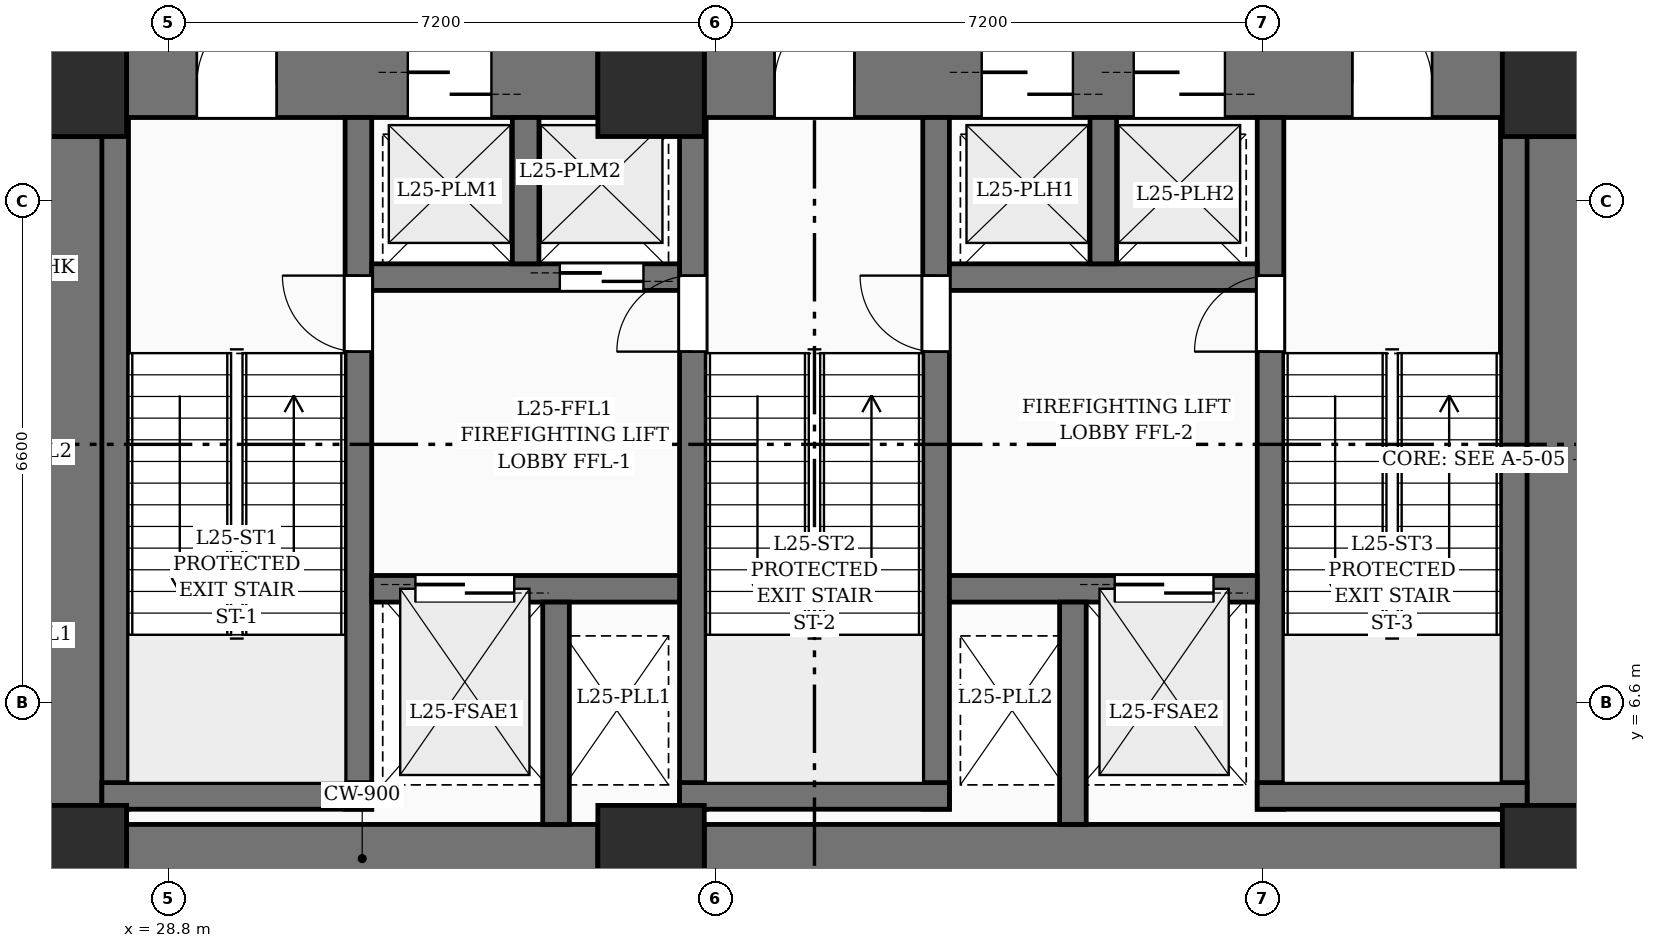
"""IFC4 building model, lengths in metres.
Left out: names, types, materials, properties, quantities, classifications, styles, units other than length and angle.
Written with IfcOpenShell. Run it as: python <this file> out.ifc"""

import sys

from ifc_helpers import new_model, si_unit, direction, frame, frame_2d, origin, origin_2d, place, context, subcontext, project, spatial, rectangle, extrude, element, fill, save


model = new_model("IFC4")
c1 = context("Model", 3, precision=1e-05, world=origin(), true_north=direction((0.0, 1.0)))
c2 = subcontext(c1, "Body", "Model", "MODEL_VIEW")
j1 = project(units=[si_unit("LENGTHUNIT", "METRE"), si_unit("PLANEANGLEUNIT", "RADIAN")], contexts=[c1])
p1 = place(None, origin())
s1 = spatial("IfcSite", under=j1, at=p1, CompositionType="ELEMENT")
p2 = place(p1, origin())
s2 = spatial("IfcBuilding", under=s1, at=p2, CompositionType="ELEMENT")
p3 = place(p2, frame((0.0, 0.0, 100.2)))
s3 = spatial("IfcBuildingStorey", under=s2, at=p3, CompositionType="ELEMENT", Elevation=100.2)
for number, where, z_axis, x_axis in (
    (1, (27.55, 4.55, 0.0), (0.0, 0.0, 1.0), (1.0, 0.0, 0.0)),
    (2, (35.15, 4.55, 0.0), (0.0, 0.0, 1.0), (1.0, 0.0, 0.0)),
    (3, (47.05, 4.55, 0.0), (0.0, 0.0, 1.0), (1.0, 0.0, 0.0)),
    (4, (27.55, 14.75, 0.0), (0.0, 0.0, 1.0), (1.0, 0.0, 0.0)),
    (5, (35.15, 14.75, 0.0), (0.0, 0.0, 1.0), (1.0, 0.0, 0.0)),
    (6, (47.05, 14.75, 0.0), (0.0, 0.0, 1.0), (1.0, 0.0, 0.0)),
):
    element("IfcColumn", number, at=place(p3, frame(where, z_axis=z_axis, x_axis=x_axis)), inside=s3, PredefinedType="COLUMN", context=c2, shape_type="SweptSolid", body=[
        extrude(rectangle(XDim=1.4, YDim=1.4, at=origin_2d()), origin(), (0.0, 0.0, 1.0), 4.8),
    ])
p4 = place(p3, frame((28.25, 4.55, 0.0), z_axis=(0.0, 0.0, 1.0), x_axis=(1.0, 0.0, 0.0)))
e7 = element("IfcWall", 7, at=p4, inside=s3, PredefinedType="SHEAR", context=c2, shape_type="SweptSolid", body=[
    extrude(rectangle(XDim=6.2, YDim=0.9, at=frame_2d((3.1, 0.0))), origin(), (0.0, 0.0, 1.0), 4.8),
])
p5 = place(p3, frame((35.85, 4.55, 0.0), z_axis=(0.0, 0.0, 1.0), x_axis=(1.0, 0.0, 0.0)))
e8 = element("IfcWall", 8, at=p5, inside=s3, PredefinedType="SHEAR", context=c2, shape_type="SweptSolid", body=[
    extrude(rectangle(XDim=10.5, YDim=0.9, at=frame_2d((5.25, 0.0))), origin(), (0.0, 0.0, 1.0), 4.8),
])
p6 = place(p3, frame((28.25, 14.75, 0.0), z_axis=(0.0, 0.0, 1.0), x_axis=(1.0, 0.0, 0.0)))
e9 = element("IfcWall", 9, at=p6, inside=s3, PredefinedType="SHEAR", context=c2, shape_type="SweptSolid", body=[
    extrude(rectangle(XDim=6.2, YDim=0.9, at=frame_2d((3.1, 0.0))), origin(), (0.0, 0.0, 1.0), 4.8),
])
p7 = place(p6, frame((0.925, 0.0, 0.0)))
e10 = element("IfcOpeningElement", 10, at=p7, cuts=e9, PredefinedType="OPENING", context=c2, shape_type="SweptSolid", body=[
    extrude(rectangle(XDim=1.05, YDim=2.15, at=frame_2d((0.525, 1.075))), frame((0.0, 0.46, 0.0), z_axis=(0.0, -1.0, 0.0), x_axis=(1.0, 0.0, 0.0)), (0.0, 0.0, 1.0), 0.92),
])
p8 = place(p6, frame((3.7, 0.0, 0.0)))
e11 = element("IfcOpeningElement", 11, at=p8, cuts=e9, PredefinedType="OPENING", context=c2, shape_type="SweptSolid", body=[
    extrude(rectangle(XDim=1.1, YDim=2.2, at=frame_2d((0.55, 1.1))), frame((0.0, 0.46, 0.0), z_axis=(0.0, -1.0, 0.0), x_axis=(1.0, 0.0, 0.0)), (0.0, 0.0, 1.0), 0.92),
])
p9 = place(p3, frame((35.85, 14.75, 0.0), z_axis=(0.0, 0.0, 1.0), x_axis=(1.0, 0.0, 0.0)))
e12 = element("IfcWall", 12, at=p9, inside=s3, PredefinedType="SHEAR", context=c2, shape_type="SweptSolid", body=[
    extrude(rectangle(XDim=10.5, YDim=0.9, at=frame_2d((5.25, 0.0))), origin(), (0.0, 0.0, 1.0), 4.8),
])
p10 = place(p9, frame((0.925, 0.0, 0.0)))
e13 = element("IfcOpeningElement", 13, at=p10, cuts=e12, PredefinedType="OPENING", context=c2, shape_type="SweptSolid", body=[
    extrude(rectangle(XDim=1.05, YDim=2.15, at=frame_2d((0.525, 1.075))), frame((0.0, 0.46, 0.0), z_axis=(0.0, -1.0, 0.0), x_axis=(1.0, 0.0, 0.0)), (0.0, 0.0, 1.0), 0.92),
])
p11 = place(p9, frame((8.525, 0.0, 0.0)))
e14 = element("IfcOpeningElement", 14, at=p11, cuts=e12, PredefinedType="OPENING", context=c2, shape_type="SweptSolid", body=[
    extrude(rectangle(XDim=1.05, YDim=2.15, at=frame_2d((0.525, 1.075))), frame((0.0, 0.46, 0.0), z_axis=(0.0, -1.0, 0.0), x_axis=(1.0, 0.0, 0.0)), (0.0, 0.0, 1.0), 0.92),
])
p12 = place(p9, frame((3.65, 0.0, 0.0)))
e15 = element("IfcOpeningElement", 15, at=p12, cuts=e12, PredefinedType="OPENING", context=c2, shape_type="SweptSolid", body=[
    extrude(rectangle(XDim=1.2, YDim=2.2, at=frame_2d((0.6, 1.1))), frame((0.0, 0.46, 0.0), z_axis=(0.0, -1.0, 0.0), x_axis=(1.0, 0.0, 0.0)), (0.0, 0.0, 1.0), 0.92),
])
p13 = place(p9, frame((5.65, 0.0, 0.0)))
e16 = element("IfcOpeningElement", 16, at=p13, cuts=e12, PredefinedType="OPENING", context=c2, shape_type="SweptSolid", body=[
    extrude(rectangle(XDim=1.2, YDim=2.2, at=frame_2d((0.6, 1.1))), frame((0.0, 0.46, 0.0), z_axis=(0.0, -1.0, 0.0), x_axis=(1.0, 0.0, 0.0)), (0.0, 0.0, 1.0), 0.92),
])
for number, where, z_axis, x_axis in (
    (17, (27.55, 5.25, 0.0), (0.0, 0.0, 1.0), (0.0, 1.0, 0.0)),
    (18, (47.05, 5.25, 0.0), (0.0, 0.0, 1.0), (0.0, 1.0, 0.0)),
):
    element("IfcWall", number, at=place(p3, frame(where, z_axis=z_axis, x_axis=x_axis)), inside=s3, PredefinedType="SHEAR", context=c2, shape_type="SweptSolid", body=[
        extrude(rectangle(XDim=8.8, YDim=0.9, at=frame_2d((4.4, 0.0))), origin(), (0.0, 0.0, 1.0), 4.8),
    ])
p14 = place(p3, frame((28.1, 5.2, 0.0), z_axis=(0.0, 0.0, 1.0), x_axis=(0.0, 1.0, 0.0)))
e19 = element("IfcWall", 19, at=p14, inside=s3, PredefinedType="SOLIDWALL", context=c2, shape_type="SweptSolid", body=[
    extrude(rectangle(XDim=9.1, YDim=0.35, at=frame_2d((4.55, 0.0))), origin(), (0.0, 0.0, 1.0), 4.8),
])
p15 = place(p3, frame((31.3, 5.2, 0.0), z_axis=(0.0, 0.0, 1.0), x_axis=(0.0, 1.0, 0.0)))
e20 = element("IfcWall", 20, at=p15, inside=s3, PredefinedType="SOLIDWALL", context=c2, shape_type="SweptSolid", body=[
    extrude(rectangle(XDim=9.1, YDim=0.35, at=frame_2d((4.55, 0.0))), origin(), (0.0, 0.0, 1.0), 4.8),
])
p16 = place(p15, frame((6.02, 0.0, 0.0)))
e21 = element("IfcOpeningElement", 21, at=p16, cuts=e20, PredefinedType="OPENING", context=c2, shape_type="SweptSolid", body=[
    extrude(rectangle(XDim=1.0, YDim=2.15, at=frame_2d((0.5, 1.075))), frame((0.0, 0.185, 0.0), z_axis=(0.0, -1.0, 0.0), x_axis=(1.0, 0.0, 0.0)), (0.0, 0.0, 1.0), 0.37),
])
p17 = place(p3, frame((27.925, 5.375, 0.0), z_axis=(0.0, 0.0, 1.0), x_axis=(1.0, 0.0, 0.0)))
e22 = element("IfcWall", 22, at=p17, inside=s3, PredefinedType="SOLIDWALL", context=c2, shape_type="SweptSolid", body=[
    extrude(rectangle(XDim=3.55, YDim=0.35, at=frame_2d((1.775, 0.0))), origin(), (0.0, 0.0, 1.0), 4.8),
])
p18 = place(p3, frame((35.7, 5.2, 0.0), z_axis=(0.0, 0.0, 1.0), x_axis=(0.0, 1.0, 0.0)))
e23 = element("IfcWall", 23, at=p18, inside=s3, PredefinedType="SOLIDWALL", context=c2, shape_type="SweptSolid", body=[
    extrude(rectangle(XDim=9.1, YDim=0.35, at=frame_2d((4.55, 0.0))), origin(), (0.0, 0.0, 1.0), 4.8),
])
p19 = place(p18, frame((6.02, 0.0, 0.0)))
e24 = element("IfcOpeningElement", 24, at=p19, cuts=e23, PredefinedType="OPENING", context=c2, shape_type="SweptSolid", body=[
    extrude(rectangle(XDim=1.0, YDim=2.15, at=frame_2d((0.5, 1.075))), frame((0.0, 0.185, 0.0), z_axis=(0.0, -1.0, 0.0), x_axis=(1.0, 0.0, 0.0)), (0.0, 0.0, 1.0), 0.37),
])
p20 = place(p3, frame((38.9, 5.2, 0.0), z_axis=(0.0, 0.0, 1.0), x_axis=(0.0, 1.0, 0.0)))
e25 = element("IfcWall", 25, at=p20, inside=s3, PredefinedType="SOLIDWALL", context=c2, shape_type="SweptSolid", body=[
    extrude(rectangle(XDim=9.1, YDim=0.35, at=frame_2d((4.55, 0.0))), origin(), (0.0, 0.0, 1.0), 4.8),
])
p21 = place(p20, frame((6.02, 0.0, 0.0)))
e26 = element("IfcOpeningElement", 26, at=p21, cuts=e25, PredefinedType="OPENING", context=c2, shape_type="SweptSolid", body=[
    extrude(rectangle(XDim=1.0, YDim=2.15, at=frame_2d((0.5, 1.075))), frame((0.0, 0.185, 0.0), z_axis=(0.0, -1.0, 0.0), x_axis=(1.0, 0.0, 0.0)), (0.0, 0.0, 1.0), 0.37),
])
p22 = place(p3, frame((35.525, 5.375, 0.0), z_axis=(0.0, 0.0, 1.0), x_axis=(1.0, 0.0, 0.0)))
e27 = element("IfcWall", 27, at=p22, inside=s3, PredefinedType="SOLIDWALL", context=c2, shape_type="SweptSolid", body=[
    extrude(rectangle(XDim=3.55, YDim=0.35, at=frame_2d((1.775, 0.0))), origin(), (0.0, 0.0, 1.0), 4.8),
])
p23 = place(p3, frame((43.3, 5.2, 0.0), z_axis=(0.0, 0.0, 1.0), x_axis=(0.0, 1.0, 0.0)))
e28 = element("IfcWall", 28, at=p23, inside=s3, PredefinedType="SOLIDWALL", context=c2, shape_type="SweptSolid", body=[
    extrude(rectangle(XDim=9.1, YDim=0.35, at=frame_2d((4.55, 0.0))), origin(), (0.0, 0.0, 1.0), 4.8),
])
p24 = place(p23, frame((6.02, 0.0, 0.0)))
e29 = element("IfcOpeningElement", 29, at=p24, cuts=e28, PredefinedType="OPENING", context=c2, shape_type="SweptSolid", body=[
    extrude(rectangle(XDim=1.0, YDim=2.15, at=frame_2d((0.5, 1.075))), frame((0.0, 0.185, 0.0), z_axis=(0.0, -1.0, 0.0), x_axis=(1.0, 0.0, 0.0)), (0.0, 0.0, 1.0), 0.37),
])
p25 = place(p3, frame((46.5, 5.2, 0.0), z_axis=(0.0, 0.0, 1.0), x_axis=(0.0, 1.0, 0.0)))
e30 = element("IfcWall", 30, at=p25, inside=s3, PredefinedType="SOLIDWALL", context=c2, shape_type="SweptSolid", body=[
    extrude(rectangle(XDim=9.1, YDim=0.35, at=frame_2d((4.55, 0.0))), origin(), (0.0, 0.0, 1.0), 4.8),
])
p26 = place(p3, frame((43.125, 5.375, 0.0), z_axis=(0.0, 0.0, 1.0), x_axis=(1.0, 0.0, 0.0)))
e31 = element("IfcWall", 31, at=p26, inside=s3, PredefinedType="SOLIDWALL", context=c2, shape_type="SweptSolid", body=[
    extrude(rectangle(XDim=3.55, YDim=0.35, at=frame_2d((1.775, 0.0))), origin(), (0.0, 0.0, 1.0), 4.8),
])
p27 = place(p3, frame((31.475, 8.1, 0.0), z_axis=(0.0, 0.0, 1.0), x_axis=(1.0, 0.0, 0.0)))
e32 = element("IfcWall", 32, at=p27, inside=s3, PredefinedType="SOLIDWALL", context=c2, shape_type="SweptSolid", body=[
    extrude(rectangle(XDim=4.05, YDim=0.35, at=frame_2d((2.025, 0.0))), origin(), (0.0, 0.0, 1.0), 4.8),
])
p28 = place(p27, frame((0.575, 0.0, 0.0)))
e33 = element("IfcOpeningElement", 33, at=p28, cuts=e32, PredefinedType="OPENING", context=c2, shape_type="SweptSolid", body=[
    extrude(rectangle(XDim=1.3, YDim=2.25, at=frame_2d((0.65, 1.125))), frame((0.0, 0.185, 0.0), z_axis=(0.0, -1.0, 0.0), x_axis=(1.0, 0.0, 0.0)), (0.0, 0.0, 1.0), 0.37),
])
p29 = place(p3, frame((39.075, 8.1, 0.0), z_axis=(0.0, 0.0, 1.0), x_axis=(1.0, 0.0, 0.0)))
e34 = element("IfcWall", 34, at=p29, inside=s3, PredefinedType="SOLIDWALL", context=c2, shape_type="SweptSolid", body=[
    extrude(rectangle(XDim=4.05, YDim=0.35, at=frame_2d((2.025, 0.0))), origin(), (0.0, 0.0, 1.0), 4.8),
])
p30 = place(p29, frame((2.175, 0.0, 0.0)))
e35 = element("IfcOpeningElement", 35, at=p30, cuts=e34, PredefinedType="OPENING", context=c2, shape_type="SweptSolid", body=[
    extrude(rectangle(XDim=1.3, YDim=2.25, at=frame_2d((0.65, 1.125))), frame((0.0, 0.185, 0.0), z_axis=(0.0, -1.0, 0.0), x_axis=(1.0, 0.0, 0.0)), (0.0, 0.0, 1.0), 0.37),
])
for number, where, z_axis, x_axis in (
    (36, (33.9, 5.0, 0.0), (0.0, 0.0, 1.0), (0.0, 1.0, 0.0)),
    (37, (40.7, 5.0, 0.0), (0.0, 0.0, 1.0), (0.0, 1.0, 0.0)),
):
    element("IfcWall", number, at=place(p3, frame(where, z_axis=z_axis, x_axis=x_axis)), inside=s3, PredefinedType="SOLIDWALL", context=c2, shape_type="SweptSolid", body=[
        extrude(rectangle(XDim=2.925, YDim=0.35, at=frame_2d((1.462, 0.0))), origin(), (0.0, 0.0, 1.0), 4.8),
    ])
p31 = place(p3, frame((31.475, 12.2, 0.0), z_axis=(0.0, 0.0, 1.0), x_axis=(1.0, 0.0, 0.0)))
e38 = element("IfcWall", 38, at=p31, inside=s3, PredefinedType="SOLIDWALL", context=c2, shape_type="SweptSolid", body=[
    extrude(rectangle(XDim=4.05, YDim=0.35, at=frame_2d((2.025, 0.0))), origin(), (0.0, 0.0, 1.0), 4.8),
])
p32 = place(p31, frame((2.475, 0.0, 0.0)))
e39 = element("IfcOpeningElement", 39, at=p32, cuts=e38, PredefinedType="OPENING", context=c2, shape_type="SweptSolid", body=[
    extrude(rectangle(XDim=1.1, YDim=2.2, at=frame_2d((0.55, 1.1))), frame((0.0, 0.185, 0.0), z_axis=(0.0, -1.0, 0.0), x_axis=(1.0, 0.0, 0.0)), (0.0, 0.0, 1.0), 0.37),
])
p33 = place(p3, frame((33.5, 12.375, 0.0), z_axis=(0.0, 0.0, 1.0), x_axis=(0.0, 1.0, 0.0)))
e40 = element("IfcWall", 40, at=p33, inside=s3, PredefinedType="SOLIDWALL", context=c2, shape_type="SweptSolid", body=[
    extrude(rectangle(XDim=1.925, YDim=0.35, at=frame_2d((0.962, 0.0))), origin(), (0.0, 0.0, 1.0), 4.8),
])
p34 = place(p3, frame((39.075, 12.2, 0.0), z_axis=(0.0, 0.0, 1.0), x_axis=(1.0, 0.0, 0.0)))
e41 = element("IfcWall", 41, at=p34, inside=s3, PredefinedType="SOLIDWALL", context=c2, shape_type="SweptSolid", body=[
    extrude(rectangle(XDim=4.05, YDim=0.35, at=frame_2d((2.025, 0.0))), origin(), (0.0, 0.0, 1.0), 4.8),
])
p35 = place(p3, frame((41.1, 12.375, 0.0), z_axis=(0.0, 0.0, 1.0), x_axis=(0.0, 1.0, 0.0)))
e42 = element("IfcWall", 42, at=p35, inside=s3, PredefinedType="SOLIDWALL", context=c2, shape_type="SweptSolid", body=[
    extrude(rectangle(XDim=1.925, YDim=0.35, at=frame_2d((0.962, 0.0))), origin(), (0.0, 0.0, 1.0), 4.8),
])
p36 = place(p7, origin())
e43 = element("IfcDoor", 43, at=p36, inside=s3, OperationType="SINGLE_SWING_RIGHT", PredefinedType="DOOR", context=c2, shape_type="SweptSolid", body=[
    extrude(rectangle(XDim=1.05, YDim=2.15, at=frame_2d((0.525, 1.075))), frame((0.0, 0.025, 0.0), z_axis=(0.0, -1.0, 0.0), x_axis=(1.0, 0.0, 0.0)), (0.0, 0.0, 1.0), 0.05),
])
fill(e10, e43)
p37 = place(p10, origin())
e44 = element("IfcDoor", 44, at=p37, inside=s3, OperationType="SINGLE_SWING_RIGHT", PredefinedType="DOOR", context=c2, shape_type="SweptSolid", body=[
    extrude(rectangle(XDim=1.05, YDim=2.15, at=frame_2d((0.525, 1.075))), frame((0.0, 0.025, 0.0), z_axis=(0.0, -1.0, 0.0), x_axis=(1.0, 0.0, 0.0)), (0.0, 0.0, 1.0), 0.05),
])
fill(e13, e44)
p38 = place(p11, origin())
e45 = element("IfcDoor", 45, at=p38, inside=s3, OperationType="SINGLE_SWING_LEFT", PredefinedType="DOOR", context=c2, shape_type="SweptSolid", body=[
    extrude(rectangle(XDim=1.05, YDim=2.15, at=frame_2d((0.525, 1.075))), frame((0.0, 0.025, 0.0), z_axis=(0.0, -1.0, 0.0), x_axis=(1.0, 0.0, 0.0)), (0.0, 0.0, 1.0), 0.05),
])
fill(e14, e45)
p39 = place(p16, origin())
e46 = element("IfcDoor", 46, at=p39, inside=s3, OperationType="SINGLE_SWING_RIGHT", PredefinedType="DOOR", context=c2, shape_type="SweptSolid", body=[
    extrude(rectangle(XDim=1.0, YDim=2.15, at=frame_2d((0.5, 1.075))), frame((0.0, 0.025, 0.0), z_axis=(0.0, -1.0, 0.0), x_axis=(1.0, 0.0, 0.0)), (0.0, 0.0, 1.0), 0.05),
])
fill(e21, e46)
p40 = place(p19, origin())
e47 = element("IfcDoor", 47, at=p40, inside=s3, OperationType="SINGLE_SWING_LEFT", PredefinedType="DOOR", context=c2, shape_type="SweptSolid", body=[
    extrude(rectangle(XDim=1.0, YDim=2.15, at=frame_2d((0.5, 1.075))), frame((0.0, 0.025, 0.0), z_axis=(0.0, -1.0, 0.0), x_axis=(1.0, 0.0, 0.0)), (0.0, 0.0, 1.0), 0.05),
])
fill(e24, e47)
p41 = place(p21, origin())
e48 = element("IfcDoor", 48, at=p41, inside=s3, OperationType="SINGLE_SWING_RIGHT", PredefinedType="DOOR", context=c2, shape_type="SweptSolid", body=[
    extrude(rectangle(XDim=1.0, YDim=2.15, at=frame_2d((0.5, 1.075))), frame((0.0, 0.025, 0.0), z_axis=(0.0, -1.0, 0.0), x_axis=(1.0, 0.0, 0.0)), (0.0, 0.0, 1.0), 0.05),
])
fill(e26, e48)
p42 = place(p24, origin())
e49 = element("IfcDoor", 49, at=p42, inside=s3, OperationType="SINGLE_SWING_LEFT", PredefinedType="DOOR", context=c2, shape_type="SweptSolid", body=[
    extrude(rectangle(XDim=1.0, YDim=2.15, at=frame_2d((0.5, 1.075))), frame((0.0, 0.025, 0.0), z_axis=(0.0, -1.0, 0.0), x_axis=(1.0, 0.0, 0.0)), (0.0, 0.0, 1.0), 0.05),
])
fill(e29, e49)
p43 = place(p28, origin())
e50 = element("IfcDoor", 50, at=p43, inside=s3, OperationType="DOUBLE_DOOR_SLIDING", PredefinedType="DOOR", context=c2, shape_type="SweptSolid", body=[
    extrude(rectangle(XDim=1.3, YDim=2.25, at=frame_2d((0.65, 1.125))), frame((0.0, 0.025, 0.0), z_axis=(0.0, -1.0, 0.0), x_axis=(1.0, 0.0, 0.0)), (0.0, 0.0, 1.0), 0.05),
])
fill(e33, e50)
p44 = place(p30, origin())
e51 = element("IfcDoor", 51, at=p44, inside=s3, OperationType="DOUBLE_DOOR_SLIDING", PredefinedType="DOOR", context=c2, shape_type="SweptSolid", body=[
    extrude(rectangle(XDim=1.3, YDim=2.25, at=frame_2d((0.65, 1.125))), frame((0.0, 0.025, 0.0), z_axis=(0.0, -1.0, 0.0), x_axis=(1.0, 0.0, 0.0)), (0.0, 0.0, 1.0), 0.05),
])
fill(e35, e51)
p45 = place(p8, origin())
e52 = element("IfcDoor", 52, at=p45, inside=s3, OperationType="DOUBLE_DOOR_SLIDING", PredefinedType="DOOR", context=c2, shape_type="SweptSolid", body=[
    extrude(rectangle(XDim=1.1, YDim=2.2, at=frame_2d((0.55, 1.1))), frame((0.0, 0.025, 0.0), z_axis=(0.0, -1.0, 0.0), x_axis=(1.0, 0.0, 0.0)), (0.0, 0.0, 1.0), 0.05),
])
fill(e11, e52)
p46 = place(p32, origin())
e53 = element("IfcDoor", 53, at=p46, inside=s3, OperationType="DOUBLE_DOOR_SLIDING", PredefinedType="DOOR", context=c2, shape_type="SweptSolid", body=[
    extrude(rectangle(XDim=1.1, YDim=2.2, at=frame_2d((0.55, 1.1))), frame((0.0, 0.025, 0.0), z_axis=(0.0, -1.0, 0.0), x_axis=(1.0, 0.0, 0.0)), (0.0, 0.0, 1.0), 0.05),
])
fill(e39, e53)
p47 = place(p12, origin())
e54 = element("IfcDoor", 54, at=p47, inside=s3, OperationType="DOUBLE_DOOR_SLIDING", PredefinedType="DOOR", context=c2, shape_type="SweptSolid", body=[
    extrude(rectangle(XDim=1.2, YDim=2.2, at=frame_2d((0.6, 1.1))), frame((0.0, 0.025, 0.0), z_axis=(0.0, -1.0, 0.0), x_axis=(1.0, 0.0, 0.0)), (0.0, 0.0, 1.0), 0.05),
])
fill(e15, e54)
p48 = place(p13, origin())
e55 = element("IfcDoor", 55, at=p48, inside=s3, OperationType="DOUBLE_DOOR_SLIDING", PredefinedType="DOOR", context=c2, shape_type="SweptSolid", body=[
    extrude(rectangle(XDim=1.2, YDim=2.2, at=frame_2d((0.6, 1.1))), frame((0.0, 0.025, 0.0), z_axis=(0.0, -1.0, 0.0), x_axis=(1.0, 0.0, 0.0)), (0.0, 0.0, 1.0), 0.05),
])
fill(e16, e55)
save(model, sys.argv[1])
